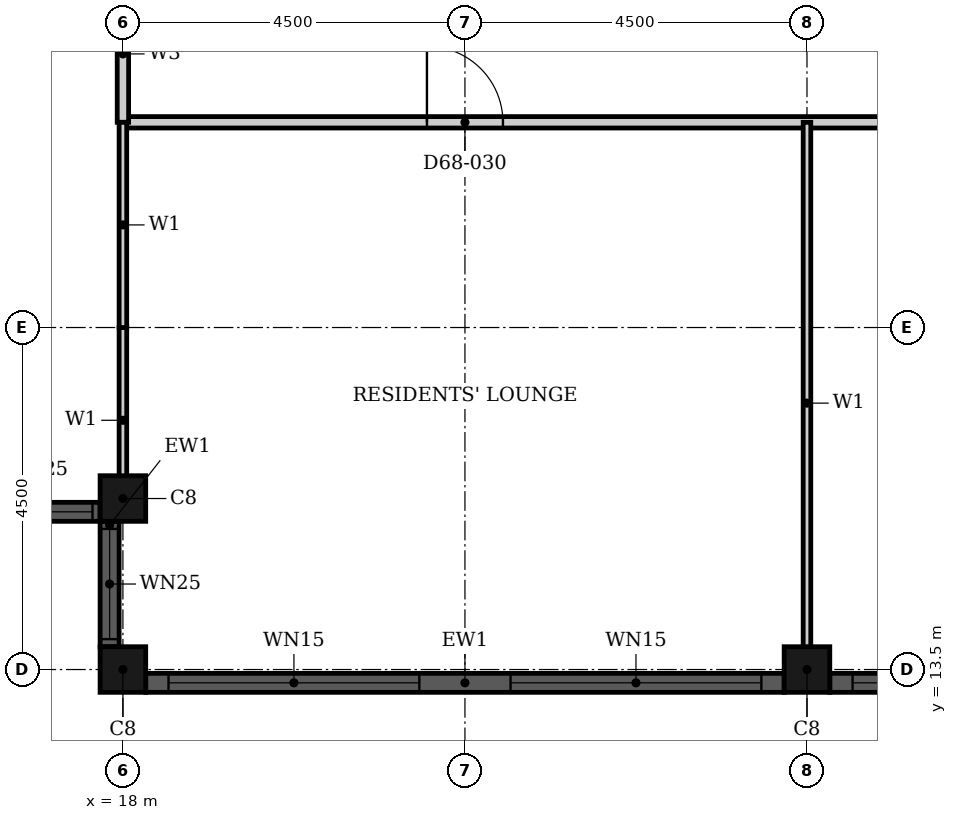
"""IFC4 building model, lengths in metres.
Left out: names, types, materials, properties, quantities, classifications, styles, units other than length and angle.
Written with IfcOpenShell. Run it as: python <this file> out.ifc"""

import sys

from ifc_helpers import new_model, si_unit, direction, frame, frame_2d, origin, origin_2d, place, context, subcontext, project, spatial, rectangle, hollow_rectangle, extrude, element, fill, save


model = new_model("IFC4")
c1 = context("Model", 3, precision=1e-05, world=origin(), true_north=direction((0.0, 1.0)))
c2 = subcontext(c1, "Body", "Model", "MODEL_VIEW")
j1 = project(units=[si_unit("LENGTHUNIT", "METRE"), si_unit("PLANEANGLEUNIT", "RADIAN")], contexts=[c1])
p1 = place(None, origin())
s1 = spatial("IfcSite", under=j1, at=p1, CompositionType="ELEMENT")
p2 = place(p1, origin())
s2 = spatial("IfcBuilding", under=s1, at=p2, CompositionType="ELEMENT")
p3 = place(p2, frame((0.0, 0.0, 267.5)))
s3 = spatial("IfcBuildingStorey", under=s2, at=p3, CompositionType="ELEMENT", Elevation=267.5)
for number, where, z_axis, x_axis in (
    (1, (18.0, 15.75, 0.0), (0.0, 0.0, 1.0), (1.0, 0.0, 0.0)),
    (2, (18.0, 13.5, 0.0), (0.0, 0.0, 1.0), (1.0, 0.0, 0.0)),
    (3, (27.0, 13.5, 0.0), (0.0, 0.0, 1.0), (1.0, 0.0, 0.0)),
):
    element("IfcColumn", number, at=place(p3, frame(where, z_axis=z_axis, x_axis=x_axis)), inside=s3, PredefinedType="COLUMN", context=c2, shape_type="SweptSolid", body=[
        extrude(hollow_rectangle(XDim=0.6, YDim=0.6, WallThickness=0.02, at=origin_2d()), origin(), (0.0, 0.0, 1.0), 3.7),
    ])
p4 = place(p3, frame((16.05, 15.575, 0.0), z_axis=(0.0, 0.0, 1.0), x_axis=(1.0, 0.0, 0.0)))
e4 = element("IfcWall", 4, at=p4, inside=s3, PredefinedType="SOLIDWALL", context=c2, shape_type="SweptSolid", body=[
    extrude(rectangle(XDim=1.65, YDim=0.25, at=frame_2d((0.825, 0.0))), origin(), (0.0, 0.0, 1.0), 3.7),
])
p5 = place(p4, frame((0.1, 0.0, 0.9)))
e5 = element("IfcOpeningElement", 5, at=p5, cuts=e4, PredefinedType="OPENING", context=c2, shape_type="SweptSolid", body=[
    extrude(rectangle(XDim=1.45, YDim=1.85, at=frame_2d((0.725, 0.925))), frame((0.0, 0.135, 0.0), z_axis=(0.0, -1.0, 0.0), x_axis=(1.0, 0.0, 0.0)), (0.0, 0.0, 1.0), 0.27),
])
p6 = place(p3, frame((17.825, 15.45, 0.0), z_axis=(0.0, 0.0, 1.0), x_axis=(0.0, -1.0, 0.0)))
e6 = element("IfcWall", 6, at=p6, inside=s3, PredefinedType="SOLIDWALL", context=c2, shape_type="SweptSolid", body=[
    extrude(rectangle(XDim=1.65, YDim=0.25, at=frame_2d((0.825, 0.0))), origin(), (0.0, 0.0, 1.0), 3.7),
])
p7 = place(p6, frame((0.1, 0.0, 0.9)))
e7 = element("IfcOpeningElement", 7, at=p7, cuts=e6, PredefinedType="OPENING", context=c2, shape_type="SweptSolid", body=[
    extrude(rectangle(XDim=1.45, YDim=1.85, at=frame_2d((0.725, 0.925))), frame((0.0, 0.135, 0.0), z_axis=(0.0, -1.0, 0.0), x_axis=(1.0, 0.0, 0.0)), (0.0, 0.0, 1.0), 0.27),
])
p8 = place(p3, frame((18.3, 13.325, 0.0), z_axis=(0.0, 0.0, 1.0), x_axis=(1.0, 0.0, 0.0)))
e8 = element("IfcWall", 8, at=p8, inside=s3, PredefinedType="SOLIDWALL", context=c2, shape_type="SweptSolid", body=[
    extrude(rectangle(XDim=8.4, YDim=0.25, at=frame_2d((4.2, 0.0))), origin(), (0.0, 0.0, 1.0), 3.7),
])
p9 = place(p8, frame((0.3, 0.0, 0.45)))
e9 = element("IfcOpeningElement", 9, at=p9, cuts=e8, PredefinedType="OPENING", context=c2, shape_type="SweptSolid", body=[
    extrude(rectangle(XDim=3.3, YDim=2.3, at=frame_2d((1.65, 1.15))), frame((0.0, 0.135, 0.0), z_axis=(0.0, -1.0, 0.0), x_axis=(1.0, 0.0, 0.0)), (0.0, 0.0, 1.0), 0.27),
])
p10 = place(p8, frame((4.8, 0.0, 0.45)))
e10 = element("IfcOpeningElement", 10, at=p10, cuts=e8, PredefinedType="OPENING", context=c2, shape_type="SweptSolid", body=[
    extrude(rectangle(XDim=3.3, YDim=2.3, at=frame_2d((1.65, 1.15))), frame((0.0, 0.135, 0.0), z_axis=(0.0, -1.0, 0.0), x_axis=(1.0, 0.0, 0.0)), (0.0, 0.0, 1.0), 0.27),
])
p11 = place(p3, frame((27.3, 13.325, 0.0), z_axis=(0.0, 0.0, 1.0), x_axis=(1.0, 0.0, 0.0)))
e11 = element("IfcWall", 11, at=p11, inside=s3, PredefinedType="SOLIDWALL", context=c2, shape_type="SweptSolid", body=[
    extrude(rectangle(XDim=8.4, YDim=0.25, at=frame_2d((4.2, 0.0))), origin(), (0.0, 0.0, 1.0), 3.7),
])
p12 = place(p11, frame((0.3, 0.0, 0.45)))
e12 = element("IfcOpeningElement", 12, at=p12, cuts=e11, PredefinedType="OPENING", context=c2, shape_type="SweptSolid", body=[
    extrude(rectangle(XDim=3.3, YDim=2.3, at=frame_2d((1.65, 1.15))), frame((0.0, 0.135, 0.0), z_axis=(0.0, -1.0, 0.0), x_axis=(1.0, 0.0, 0.0)), (0.0, 0.0, 1.0), 0.27),
])
p13 = place(p11, frame((4.8, 0.0, 0.45)))
e13 = element("IfcOpeningElement", 13, at=p13, cuts=e11, PredefinedType="OPENING", context=c2, shape_type="SweptSolid", body=[
    extrude(rectangle(XDim=3.3, YDim=2.3, at=frame_2d((1.65, 1.15))), frame((0.0, 0.135, 0.0), z_axis=(0.0, -1.0, 0.0), x_axis=(1.0, 0.0, 0.0)), (0.0, 0.0, 1.0), 0.27),
])
p14 = place(p3, frame((18.0, 20.7, 0.0), z_axis=(0.0, 0.0, 1.0), x_axis=(1.0, 0.0, 0.0)))
e14 = element("IfcWall", 14, at=p14, inside=s3, PredefinedType="PARTITIONING", context=c2, shape_type="SweptSolid", body=[
    extrude(rectangle(XDim=24.6, YDim=0.15, at=frame_2d((12.3, 0.0))), origin(), (0.0, 0.0, 1.0), 3.4),
])
p15 = place(p14, frame((4.0, 0.0, 0.0)))
e15 = element("IfcOpeningElement", 15, at=p15, cuts=e14, PredefinedType="OPENING", context=c2, shape_type="SweptSolid", body=[
    extrude(rectangle(XDim=1.0, YDim=2.1, at=frame_2d((0.5, 1.05))), frame((0.0, 0.085, 0.0), z_axis=(0.0, -1.0, 0.0), x_axis=(1.0, 0.0, 0.0)), (0.0, 0.0, 1.0), 0.17),
])
p16 = place(p14, frame((13.0, 0.0, 0.0)))
e16 = element("IfcOpeningElement", 16, at=p16, cuts=e14, PredefinedType="OPENING", context=c2, shape_type="SweptSolid", body=[
    extrude(rectangle(XDim=1.0, YDim=2.1, at=frame_2d((0.5, 1.05))), frame((0.0, 0.085, 0.0), z_axis=(0.0, -1.0, 0.0), x_axis=(1.0, 0.0, 0.0)), (0.0, 0.0, 1.0), 0.17),
])
p17 = place(p14, frame((22.3, 0.0, 0.0)))
e17 = element("IfcOpeningElement", 17, at=p17, cuts=e14, PredefinedType="OPENING", context=c2, shape_type="SweptSolid", body=[
    extrude(rectangle(XDim=1.0, YDim=2.2, at=frame_2d((0.5, 1.1))), frame((0.0, 0.085, 0.0), z_axis=(0.0, -1.0, 0.0), x_axis=(1.0, 0.0, 0.0)), (0.0, 0.0, 1.0), 0.17),
])
p18 = place(p3, frame((18.0, 20.7, 0.0), z_axis=(0.0, 0.0, 1.0), x_axis=(0.0, 1.0, 0.0)))
e18 = element("IfcWall", 18, at=p18, inside=s3, PredefinedType="PARTITIONING", context=c2, shape_type="SweptSolid", body=[
    extrude(rectangle(XDim=1.8, YDim=0.15, at=frame_2d((0.9, 0.0))), origin(), (0.0, 0.0, 1.0), 3.4),
])
p19 = place(p3, frame((18.0, 15.56, 0.0), z_axis=(0.0, 0.0, 1.0), x_axis=(0.0, 1.0, 0.0)))
e19 = element("IfcWall", 19, at=p19, inside=s3, PredefinedType="PARTITIONING", context=c2, shape_type="SweptSolid", body=[
    extrude(rectangle(XDim=2.439, YDim=0.1, at=frame_2d((1.219, 0.0))), origin(), (0.0, 0.0, 1.0), 3.4),
])
p20 = place(p3, frame((18.0, 18.0, 0.0), z_axis=(0.0, 0.0, 1.0), x_axis=(0.0, 1.0, 0.0)))
e20 = element("IfcWall", 20, at=p20, inside=s3, PredefinedType="PARTITIONING", context=c2, shape_type="SweptSolid", body=[
    extrude(rectangle(XDim=2.7, YDim=0.1, at=frame_2d((1.35, 0.0))), origin(), (0.0, 0.0, 1.0), 3.4),
])
p21 = place(p3, frame((27.0, 13.31, 0.0), z_axis=(0.0, 0.0, 1.0), x_axis=(0.0, 1.0, 0.0)))
e21 = element("IfcWall", 21, at=p21, inside=s3, PredefinedType="PARTITIONING", context=c2, shape_type="SweptSolid", body=[
    extrude(rectangle(XDim=7.39, YDim=0.1, at=frame_2d((3.695, 0.0))), origin(), (0.0, 0.0, 1.0), 3.4),
])
p22 = place(p5, origin())
e22 = element("IfcWindow", 22, at=p22, inside=s3, PartitioningType="SINGLE_PANEL", PredefinedType="WINDOW", context=c2, shape_type="SweptSolid", body=[
    extrude(rectangle(XDim=1.45, YDim=1.85, at=frame_2d((0.725, 0.925))), frame((0.0, 0.03, 0.0), z_axis=(0.0, -1.0, 0.0), x_axis=(1.0, 0.0, 0.0)), (0.0, 0.0, 1.0), 0.06),
])
fill(e5, e22)
p23 = place(p7, origin())
e23 = element("IfcWindow", 23, at=p23, inside=s3, PartitioningType="SINGLE_PANEL", PredefinedType="WINDOW", context=c2, shape_type="SweptSolid", body=[
    extrude(rectangle(XDim=1.45, YDim=1.85, at=frame_2d((0.725, 0.925))), frame((0.0, 0.03, 0.0), z_axis=(0.0, -1.0, 0.0), x_axis=(1.0, 0.0, 0.0)), (0.0, 0.0, 1.0), 0.06),
])
fill(e7, e23)
p24 = place(p9, origin())
e24 = element("IfcWindow", 24, at=p24, inside=s3, PartitioningType="SINGLE_PANEL", PredefinedType="WINDOW", context=c2, shape_type="SweptSolid", body=[
    extrude(rectangle(XDim=3.3, YDim=2.3, at=frame_2d((1.65, 1.15))), frame((0.0, 0.03, 0.0), z_axis=(0.0, -1.0, 0.0), x_axis=(1.0, 0.0, 0.0)), (0.0, 0.0, 1.0), 0.06),
])
fill(e9, e24)
p25 = place(p10, origin())
e25 = element("IfcWindow", 25, at=p25, inside=s3, PartitioningType="SINGLE_PANEL", PredefinedType="WINDOW", context=c2, shape_type="SweptSolid", body=[
    extrude(rectangle(XDim=3.3, YDim=2.3, at=frame_2d((1.65, 1.15))), frame((0.0, 0.03, 0.0), z_axis=(0.0, -1.0, 0.0), x_axis=(1.0, 0.0, 0.0)), (0.0, 0.0, 1.0), 0.06),
])
fill(e10, e25)
p26 = place(p12, origin())
e26 = element("IfcWindow", 26, at=p26, inside=s3, PartitioningType="SINGLE_PANEL", PredefinedType="WINDOW", context=c2, shape_type="SweptSolid", body=[
    extrude(rectangle(XDim=3.3, YDim=2.3, at=frame_2d((1.65, 1.15))), frame((0.0, 0.03, 0.0), z_axis=(0.0, -1.0, 0.0), x_axis=(1.0, 0.0, 0.0)), (0.0, 0.0, 1.0), 0.06),
])
fill(e12, e26)
p27 = place(p15, origin())
e27 = element("IfcDoor", 27, at=p27, inside=s3, OperationType="SINGLE_SWING_LEFT", PredefinedType="DOOR", context=c2, shape_type="SweptSolid", body=[
    extrude(rectangle(XDim=1.0, YDim=2.1, at=frame_2d((0.5, 1.05))), frame((0.0, 0.025, 0.0), z_axis=(0.0, -1.0, 0.0), x_axis=(1.0, 0.0, 0.0)), (0.0, 0.0, 1.0), 0.05),
])
fill(e15, e27)
save(model, sys.argv[1])
